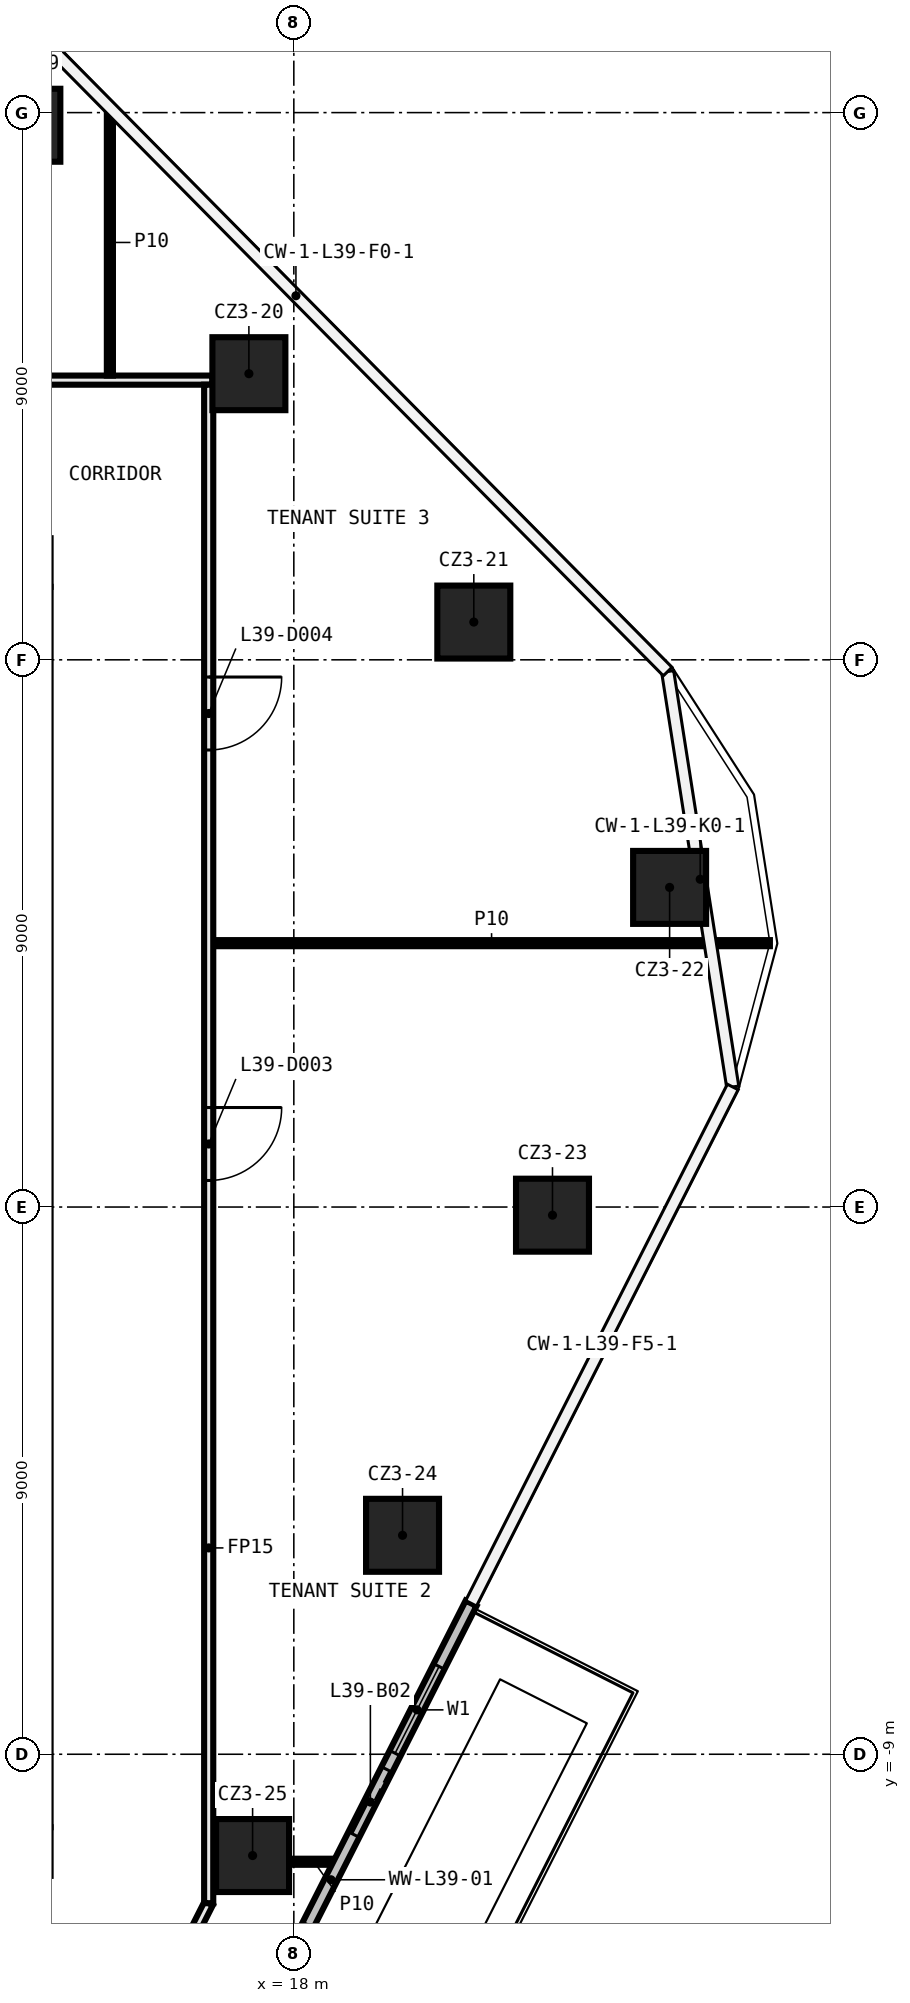
"""IFC4 building model, lengths in metres.
Left out: names, types, materials, properties, quantities, classifications, styles, units other than length and angle.
Written with IfcOpenShell. Run it as: python <this file> out.ifc"""

import sys

from ifc_helpers import new_model, si_unit, direction, frame, frame_2d, origin, origin_2d, place, context, subcontext, project, spatial, rectangle, extrude, element, fill, save


model = new_model("IFC4")
c1 = context("Model", 3, precision=1e-05, world=origin(), true_north=direction((0.0, 1.0)))
c2 = subcontext(c1, "Body", "Model", "MODEL_VIEW")
j1 = project(units=[si_unit("LENGTHUNIT", "METRE"), si_unit("PLANEANGLEUNIT", "RADIAN")], contexts=[c1])
p1 = place(None, origin())
s1 = spatial("IfcSite", under=j1, at=p1, CompositionType="ELEMENT")
p2 = place(p1, origin())
s2 = spatial("IfcBuilding", under=s1, at=p2, CompositionType="ELEMENT")
p3 = place(p2, frame((0.0, 0.0, 179.6)))
s3 = spatial("IfcBuildingStorey", under=s2, at=p3, CompositionType="ELEMENT", Elevation=179.6)
for number, where, z_axis, x_axis in (
    (1, (13.56, 17.792, 0.0), (0.0, 0.0, 1.0), (1.0, 0.0, 0.0)),
    (2, (17.261, 13.706, 0.0), (0.0, 0.0, 1.0), (1.0, 0.0, 0.0)),
    (3, (20.96, 9.621, 0.0), (0.0, 0.0, 1.0), (1.0, 0.0, 0.0)),
    (4, (24.18, 5.257, 0.0), (0.0, 0.0, 1.0), (1.0, 0.0, 0.0)),
    (5, (22.254, -0.134, 0.0), (0.0, 0.0, 1.0), (1.0, 0.0, 0.0)),
    (6, (19.788, -5.399, 0.0), (0.0, 0.0, 1.0), (1.0, 0.0, 0.0)),
    (7, (17.322, -10.666, 0.0), (0.0, 0.0, 1.0), (1.0, 0.0, 0.0)),
):
    element("IfcColumn", number, at=place(p3, frame(where, z_axis=z_axis, x_axis=x_axis)), inside=s3, PredefinedType="COLUMN", context=c2, shape_type="SweptSolid", body=[
        extrude(rectangle(XDim=1.2, YDim=1.2, at=origin_2d()), origin(), (0.0, 0.0, 1.0), 3.7),
    ])
p4 = place(p3, frame((17.922, -10.768, 0.0), z_axis=(0.0, 0.0, 1.0), x_axis=(1.0, 0.0, 0.0)))
e8 = element("IfcWall", 8, at=p4, inside=s3, PredefinedType="PARTITIONING", context=c2, shape_type="SweptSolid", body=[
    extrude(rectangle(XDim=0.817, YDim=0.1, at=frame_2d((0.409, 0.0))), origin(), (0.0, 0.0, 1.0), 3.7),
])
p5 = place(p3, frame((16.675, 4.34, 0.0), z_axis=(0.0, 0.0, 1.0), x_axis=(1.0, 0.0, 0.0)))
e9 = element("IfcWall", 9, at=p5, inside=s3, PredefinedType="PARTITIONING", context=c2, shape_type="SweptSolid", body=[
    extrude(rectangle(XDim=9.154, YDim=0.1, at=frame_2d((4.577, 0.0))), origin(), (0.0, 0.0, 1.0), 3.7),
])
p6 = place(p3, frame((-15.842, 13.6, 0.0), z_axis=(0.0, 0.0, 1.0), x_axis=(1.0, 0.0, 0.0)))
e10 = element("IfcWall", 10, at=p6, inside=s3, PredefinedType="PARTITIONING", context=c2, shape_type="SweptSolid", body=[
    extrude(rectangle(XDim=32.502, YDim=0.15, at=frame_2d((16.251, 0.0))), origin(), (0.0, 0.0, 1.0), 3.7),
])
p7 = place(p6, frame((21.974, 0.0, 0.0)))
e11 = element("IfcOpeningElement", 11, at=p7, cuts=e10, PredefinedType="OPENING", context=c2, shape_type="SweptSolid", body=[
    extrude(rectangle(XDim=1.2, YDim=2.1, at=frame_2d((0.6, 1.05))), frame((0.0, 0.085, 0.0), z_axis=(0.0, -1.0, 0.0), x_axis=(1.0, 0.0, 0.0)), (0.0, 0.0, 1.0), 0.17),
])
p8 = place(p6, frame((5.854, 0.0, 0.0)))
e12 = element("IfcOpeningElement", 12, at=p8, cuts=e10, PredefinedType="OPENING", context=c2, shape_type="SweptSolid", body=[
    extrude(rectangle(XDim=1.2, YDim=2.1, at=frame_2d((0.6, 1.05))), frame((0.0, 0.085, 0.0), z_axis=(0.0, -1.0, 0.0), x_axis=(1.0, 0.0, 0.0)), (0.0, 0.0, 1.0), 0.17),
])
p9 = place(p3, frame((15.511, -13.6, 0.0), z_axis=(0.0, 0.0, 1.0), x_axis=(0.45198735735, 0.892024343163, 0.0)))
e13 = element("IfcWall", 13, at=p9, inside=s3, PredefinedType="PARTITIONING", context=c2, shape_type="SweptSolid", body=[
    extrude(rectangle(XDim=2.411, YDim=0.15, at=frame_2d((1.205, 0.0))), origin(), (0.0, 0.0, 1.0), 3.7),
])
p10 = place(p3, frame((16.6, 13.525, 0.0), z_axis=(0.0, 0.0, 1.0), x_axis=(0.0, -1.0, 0.0)))
e14 = element("IfcWall", 14, at=p10, inside=s3, PredefinedType="PARTITIONING", context=c2, shape_type="SweptSolid", body=[
    extrude(rectangle(XDim=24.975, YDim=0.15, at=frame_2d((12.487, 0.0))), origin(), (0.0, 0.0, 1.0), 3.7),
])
p11 = place(p10, frame((11.888, 0.0, 0.0)))
e15 = element("IfcOpeningElement", 15, at=p11, cuts=e14, PredefinedType="OPENING", context=c2, shape_type="SweptSolid", body=[
    extrude(rectangle(XDim=1.2, YDim=2.1, at=frame_2d((0.6, 1.05))), frame((0.0, 0.085, 0.0), z_axis=(0.0, -1.0, 0.0), x_axis=(1.0, 0.0, 0.0)), (0.0, 0.0, 1.0), 0.17),
])
p12 = place(p10, frame((4.808, 0.0, 0.0)))
e16 = element("IfcOpeningElement", 16, at=p12, cuts=e14, PredefinedType="OPENING", context=c2, shape_type="SweptSolid", body=[
    extrude(rectangle(XDim=1.2, YDim=2.1, at=frame_2d((0.6, 1.05))), frame((0.0, 0.085, 0.0), z_axis=(0.0, -1.0, 0.0), x_axis=(1.0, 0.0, 0.0)), (0.0, 0.0, 1.0), 0.17),
])
p13 = place(p3, frame((14.975, 13.675, 0.0), z_axis=(0.0, 0.0, 1.0), x_axis=(0.0, 1.0, 0.0)))
e17 = element("IfcWall", 17, at=p13, inside=s3, PredefinedType="PARTITIONING", context=c2, shape_type="SweptSolid", body=[
    extrude(rectangle(XDim=4.379, YDim=0.1, at=frame_2d((2.189, 0.0))), origin(), (0.0, 0.0, 1.0), 3.7),
])
p14 = place(p3, frame((16.608, -15.018, 0.0), z_axis=(0.0, 0.0, 1.0), x_axis=(0.452002844598, 0.89201649563, 0.0)))
e18 = element("IfcWall", 18, at=p14, inside=s3, PredefinedType="SOLIDWALL", context=c2, shape_type="SweptSolid", body=[
    extrude(rectangle(XDim=9.53, YDim=0.2, at=frame_2d((4.765, 0.0))), origin(), (0.0, 0.0, 1.0), 3.7),
])
p15 = place(p14, frame((2.0, 0.0, 0.6)))
e19 = element("IfcOpeningElement", 19, at=p15, cuts=e18, PredefinedType="OPENING", context=c2, shape_type="SweptSolid", body=[
    extrude(rectangle(XDim=1.6, YDim=2.4, at=frame_2d((0.8, 1.2))), frame((0.0, 0.11, 0.0), z_axis=(0.0, -1.0, 0.0), x_axis=(1.0, 0.0, 0.0)), (0.0, 0.0, 1.0), 0.22),
])
p16 = place(p14, frame((0.5, 0.0, 0.0)))
e20 = element("IfcOpeningElement", 20, at=p16, cuts=e18, PredefinedType="OPENING", context=c2, shape_type="SweptSolid", body=[
    extrude(rectangle(XDim=1.2, YDim=2.4, at=frame_2d((0.6, 1.2))), frame((0.0, 0.11, 0.0), z_axis=(0.0, -1.0, 0.0), x_axis=(1.0, 0.0, 0.0)), (0.0, 0.0, 1.0), 0.22),
])
p17 = place(p14, frame((6.765, 0.0, 0.6)))
e21 = element("IfcOpeningElement", 21, at=p17, cuts=e18, PredefinedType="OPENING", context=c2, shape_type="SweptSolid", body=[
    extrude(rectangle(XDim=1.6, YDim=2.4, at=frame_2d((0.8, 1.2))), frame((0.0, 0.11, 0.0), z_axis=(0.0, -1.0, 0.0), x_axis=(1.0, 0.0, 0.0)), (0.0, 0.0, 1.0), 0.22),
])
p18 = place(p14, frame((5.265, 0.0, 0.0)))
e22 = element("IfcOpeningElement", 22, at=p18, cuts=e18, PredefinedType="OPENING", context=c2, shape_type="SweptSolid", body=[
    extrude(rectangle(XDim=1.2, YDim=2.4, at=frame_2d((0.6, 1.2))), frame((0.0, 0.11, 0.0), z_axis=(0.0, -1.0, 0.0), x_axis=(1.0, 0.0, 0.0)), (0.0, 0.0, 1.0), 0.22),
])
p19 = place(p11, origin())
e23 = element("IfcDoor", 23, at=p19, inside=s3, OperationType="SINGLE_SWING_RIGHT", PredefinedType="DOOR", context=c2, shape_type="SweptSolid", body=[
    extrude(rectangle(XDim=1.2, YDim=2.1, at=frame_2d((0.6, 1.05))), frame((0.0, 0.025, 0.0), z_axis=(0.0, -1.0, 0.0), x_axis=(1.0, 0.0, 0.0)), (0.0, 0.0, 1.0), 0.05),
])
fill(e15, e23)
p20 = place(p12, origin())
e24 = element("IfcDoor", 24, at=p20, inside=s3, OperationType="SINGLE_SWING_LEFT", PredefinedType="DOOR", context=c2, shape_type="SweptSolid", body=[
    extrude(rectangle(XDim=1.2, YDim=2.1, at=frame_2d((0.6, 1.05))), frame((0.0, 0.025, 0.0), z_axis=(0.0, -1.0, 0.0), x_axis=(1.0, 0.0, 0.0)), (0.0, 0.0, 1.0), 0.05),
])
fill(e16, e24)
p21 = place(p17, origin())
e25 = element("IfcWindow", 25, at=p21, inside=s3, PartitioningType="SINGLE_PANEL", PredefinedType="WINDOW", context=c2, shape_type="SweptSolid", body=[
    extrude(rectangle(XDim=1.6, YDim=2.4, at=frame_2d((0.8, 1.2))), frame((0.0, 0.03, 0.0), z_axis=(0.0, -1.0, 0.0), x_axis=(1.0, 0.0, 0.0)), (0.0, 0.0, 1.0), 0.06),
])
fill(e21, e25)
p22 = place(p18, origin())
e26 = element("IfcDoor", 26, at=p22, inside=s3, OperationType="SLIDING_TO_LEFT", PredefinedType="DOOR", context=c2, shape_type="SweptSolid", body=[
    extrude(rectangle(XDim=1.2, YDim=2.4, at=frame_2d((0.6, 1.2))), frame((0.0, 0.025, 0.0), z_axis=(0.0, -1.0, 0.0), x_axis=(1.0, 0.0, 0.0)), (0.0, 0.0, 1.0), 0.05),
])
fill(e22, e26)
save(model, sys.argv[1])
